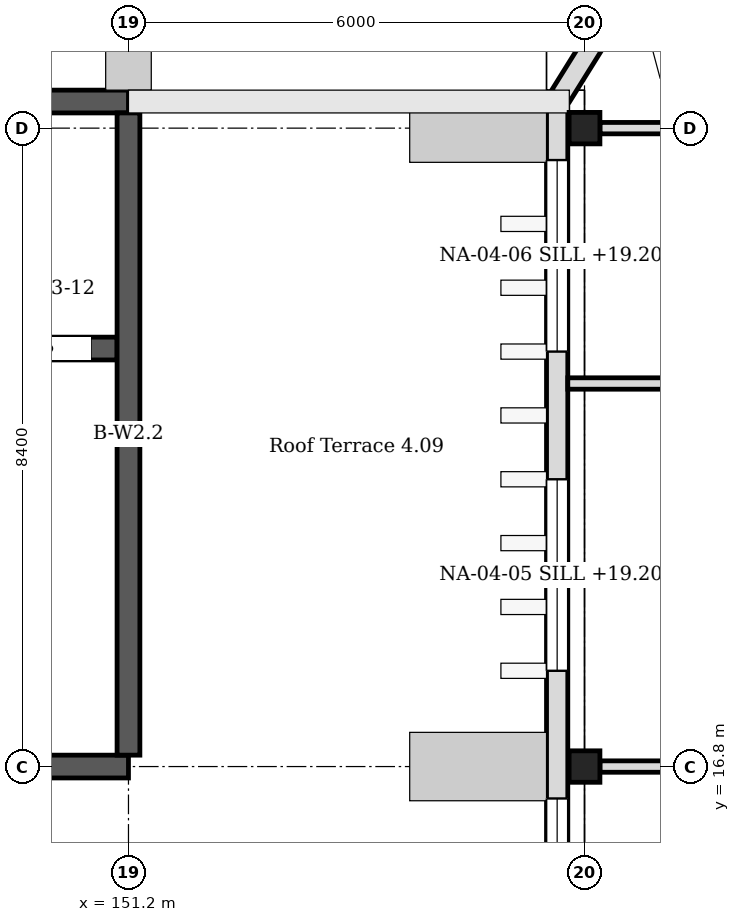
"""IFC4 building model, lengths in metres.
Left out: names, types, materials, properties, quantities, classifications, styles, units other than length and angle.
Written with IfcOpenShell. Run it as: python <this file> out.ifc"""

import sys

from ifc_helpers import new_model, si_unit, direction, frame, frame_2d, origin, origin_2d, place, context, subcontext, project, spatial, rectangle, i_section, extrude, element, fill, save


model = new_model("IFC4")
c1 = context("Model", 3, precision=1e-05, world=origin(), true_north=direction((0.0, 1.0)))
c2 = subcontext(c1, "Body", "Model", "MODEL_VIEW")
j1 = project(units=[si_unit("LENGTHUNIT", "METRE"), si_unit("PLANEANGLEUNIT", "RADIAN")], contexts=[c1])
p1 = place(None, origin())
s1 = spatial("IfcSite", under=j1, at=p1, CompositionType="ELEMENT")
p2 = place(p1, origin())
s2 = spatial("IfcBuilding", under=s1, at=p2, CompositionType="ELEMENT")
p3 = place(p2, frame((0.0, 0.0, 18.6)))
s3 = spatial("IfcBuildingStorey", under=s2, at=p3, CompositionType="ELEMENT", Elevation=18.6)
for number, where, z_axis, x_axis in (
    (1, (157.2, 16.8, 0.0), (0.0, 0.0, 1.0), (1.0, 0.0, 0.0)),
    (2, (157.2, 25.2, 0.0), (0.0, 0.0, 1.0), (1.0, 0.0, 0.0)),
):
    element("IfcColumn", number, at=place(p3, frame(where, z_axis=z_axis, x_axis=x_axis)), inside=s3, PredefinedType="COLUMN", context=c2, shape_type="SweptSolid", body=[
        extrude(i_section(OverallWidth=0.405, OverallDepth=0.414, WebThickness=0.018, FlangeThickness=0.028, FilletRadius=0.022, at=origin_2d()), origin(), (0.0, 0.0, 1.0), 4.2),
    ])
p4 = place(p3, frame((151.2, 16.95, 0.0), z_axis=(0.0, 0.0, 1.0), x_axis=(0.0, 1.0, 0.0)))
e3 = element("IfcWall", 3, at=p4, inside=s3, PredefinedType="SHEAR", context=c2, shape_type="SweptSolid", body=[
    extrude(rectangle(XDim=8.45, YDim=0.3, at=frame_2d((4.225, 0.0))), origin(), (0.0, 0.0, 1.0), 3.89),
])
p5 = place(p3, frame((142.8, 16.8, 0.0), z_axis=(0.0, 0.0, 1.0), x_axis=(1.0, 0.0, 0.0)))
e4 = element("IfcWall", 4, at=p5, inside=s3, PredefinedType="SHEAR", context=c2, shape_type="SweptSolid", body=[
    extrude(rectangle(XDim=8.4, YDim=0.3, at=frame_2d((4.2, 0.0))), origin(), (0.0, 0.0, 1.0), 3.89),
])
p6 = place(p5, frame((3.1, 0.0, 0.0)))
e5 = element("IfcOpeningElement", 5, at=p6, cuts=e4, PredefinedType="OPENING", context=c2, shape_type="SweptSolid", body=[
    extrude(rectangle(XDim=2.2, YDim=2.6, at=frame_2d((1.1, 1.3))), frame((0.0, 0.16, 0.0), z_axis=(0.0, -1.0, 0.0), x_axis=(1.0, 0.0, 0.0)), (0.0, 0.0, 1.0), 0.32),
])
p7 = place(p3, frame((142.95, 22.3, 0.0), z_axis=(0.0, 0.0, 1.0), x_axis=(1.0, 0.0, 0.0)))
e6 = element("IfcWall", 6, at=p7, inside=s3, PredefinedType="SHEAR", context=c2, shape_type="SweptSolid", body=[
    extrude(rectangle(XDim=8.1, YDim=0.3, at=frame_2d((4.05, 0.0))), origin(), (0.0, 0.0, 1.0), 3.89),
])
p8 = place(p7, frame((0.35, 0.0, 0.0)))
e7 = element("IfcOpeningElement", 7, at=p8, cuts=e6, PredefinedType="OPENING", context=c2, shape_type="SweptSolid", body=[
    extrude(rectangle(XDim=1.1, YDim=2.2, at=frame_2d((0.55, 1.1))), frame((0.0, 0.16, 0.0), z_axis=(0.0, -1.0, 0.0), x_axis=(1.0, 0.0, 0.0)), (0.0, 0.0, 1.0), 0.32),
])
p9 = place(p7, frame((6.65, 0.0, 0.0)))
e8 = element("IfcOpeningElement", 8, at=p9, cuts=e6, PredefinedType="OPENING", context=c2, shape_type="SweptSolid", body=[
    extrude(rectangle(XDim=1.1, YDim=2.2, at=frame_2d((0.55, 1.1))), frame((0.0, 0.16, 0.0), z_axis=(0.0, -1.0, 0.0), x_axis=(1.0, 0.0, 0.0)), (0.0, 0.0, 1.0), 0.32),
])
p10 = place(p3, frame((142.8, 25.55, 0.0), z_axis=(0.0, 0.0, 1.0), x_axis=(1.0, 0.0, 0.0)))
e9 = element("IfcWall", 9, at=p10, inside=s3, PredefinedType="SHEAR", context=c2, shape_type="SweptSolid", body=[
    extrude(rectangle(XDim=8.4, YDim=0.3, at=frame_2d((4.2, 0.0))), origin(), (0.0, 0.0, 1.0), 3.89),
])
p11 = place(p3, frame((156.84, -0.22, 0.0), z_axis=(0.0, 0.0, 1.0), x_axis=(0.0, 1.0, 0.0)))
e10 = element("IfcWall", 10, at=p11, inside=s3, PredefinedType="SOLIDWALL", context=c2, shape_type="SweptSolid", body=[
    extrude(rectangle(XDim=25.77, YDim=0.28, at=frame_2d((12.885, 0.0))), origin(), (0.0, 0.0, 1.0), 4.05),
])
p12 = place(p11, frame((0.64, 0.0, 0.6)))
e11 = element("IfcOpeningElement", 11, at=p12, cuts=e10, PredefinedType="OPENING", context=c2, shape_type="SweptSolid", body=[
    extrude(rectangle(XDim=2.52, YDim=2.4, at=frame_2d((1.26, 1.2))), frame((0.0, 0.15, 0.0), z_axis=(0.0, -1.0, 0.0), x_axis=(1.0, 0.0, 0.0)), (0.0, 0.0, 1.0), 0.3),
])
p13 = place(p11, frame((4.84, 0.0, 0.6)))
e12 = element("IfcOpeningElement", 12, at=p13, cuts=e10, PredefinedType="OPENING", context=c2, shape_type="SweptSolid", body=[
    extrude(rectangle(XDim=2.52, YDim=2.4, at=frame_2d((1.26, 1.2))), frame((0.0, 0.15, 0.0), z_axis=(0.0, -1.0, 0.0), x_axis=(1.0, 0.0, 0.0)), (0.0, 0.0, 1.0), 0.3),
])
p14 = place(p11, frame((9.88, 0.0, 0.6)))
e13 = element("IfcOpeningElement", 13, at=p14, cuts=e10, PredefinedType="OPENING", context=c2, shape_type="SweptSolid", body=[
    extrude(rectangle(XDim=2.52, YDim=2.4, at=frame_2d((1.26, 1.2))), frame((0.0, 0.15, 0.0), z_axis=(0.0, -1.0, 0.0), x_axis=(1.0, 0.0, 0.0)), (0.0, 0.0, 1.0), 0.3),
])
p15 = place(p11, frame((14.08, 0.0, 0.6)))
e14 = element("IfcOpeningElement", 14, at=p15, cuts=e10, PredefinedType="OPENING", context=c2, shape_type="SweptSolid", body=[
    extrude(rectangle(XDim=2.52, YDim=2.4, at=frame_2d((1.26, 1.2))), frame((0.0, 0.15, 0.0), z_axis=(0.0, -1.0, 0.0), x_axis=(1.0, 0.0, 0.0)), (0.0, 0.0, 1.0), 0.3),
])
p16 = place(p11, frame((18.28, 0.0, 0.6)))
e15 = element("IfcOpeningElement", 15, at=p16, cuts=e10, PredefinedType="OPENING", context=c2, shape_type="SweptSolid", body=[
    extrude(rectangle(XDim=2.52, YDim=2.4, at=frame_2d((1.26, 1.2))), frame((0.0, 0.15, 0.0), z_axis=(0.0, -1.0, 0.0), x_axis=(1.0, 0.0, 0.0)), (0.0, 0.0, 1.0), 0.3),
])
p17 = place(p11, frame((22.48, 0.0, 0.6)))
e16 = element("IfcOpeningElement", 16, at=p17, cuts=e10, PredefinedType="OPENING", context=c2, shape_type="SweptSolid", body=[
    extrude(rectangle(XDim=2.52, YDim=2.4, at=frame_2d((1.26, 1.2))), frame((0.0, 0.15, 0.0), z_axis=(0.0, -1.0, 0.0), x_axis=(1.0, 0.0, 0.0)), (0.0, 0.0, 1.0), 0.3),
])
p18 = place(p3, frame((156.886, 25.624, 0.0), z_axis=(0.0, 0.0, 1.0), x_axis=(0.528992500338, 0.848626498871, 0.0)))
e17 = element("IfcWall", 17, at=p18, inside=s3, PredefinedType="SOLIDWALL", context=c2, shape_type="SweptSolid", body=[
    extrude(rectangle(XDim=4.145, YDim=0.28, at=frame_2d((2.072, 0.0))), origin(), (0.0, 0.0, 1.0), 4.05),
])
p19 = place(p18, frame((0.812, 0.0, 0.6)))
e18 = element("IfcOpeningElement", 18, at=p19, cuts=e17, PredefinedType="OPENING", context=c2, shape_type="SweptSolid", body=[
    extrude(rectangle(XDim=2.52, YDim=2.4, at=frame_2d((1.26, 1.2))), frame((0.0, 0.15, 0.0), z_axis=(0.0, -1.0, 0.0), x_axis=(1.0, 0.0, 0.0)), (0.0, 0.0, 1.0), 0.3),
])
for number, where, z_axis, x_axis in (
    (19, (157.403, 16.8, 0.0), (0.0, 0.0, 1.0), (1.0, 0.0, 0.0)),
    (20, (157.403, 25.2, 0.0), (0.0, 0.0, 1.0), (1.0, 0.0, 0.0)),
):
    element("IfcWall", number, at=place(p3, frame(where, z_axis=z_axis, x_axis=x_axis)), inside=s3, PredefinedType="PARTITIONING", context=c2, shape_type="SweptSolid", body=[
        extrude(rectangle(XDim=7.995, YDim=0.15, at=frame_2d((3.998, 0.0))), origin(), (0.0, 0.0, 1.0), 3.604),
    ])
p20 = place(p3, frame((156.98, 21.84, 0.0), z_axis=(0.0, 0.0, 1.0), x_axis=(1.0, 0.0, 0.0)))
e21 = element("IfcWall", 21, at=p20, inside=s3, PredefinedType="PARTITIONING", context=c2, shape_type="SweptSolid", body=[
    extrude(rectangle(XDim=8.52, YDim=0.15, at=frame_2d((4.26, 0.0))), origin(), (0.0, 0.0, 1.0), 3.604),
])
p21 = place(p15, origin())
e22 = element("IfcWindow", 22, at=p21, inside=s3, PartitioningType="SINGLE_PANEL", PredefinedType="WINDOW", context=c2, shape_type="SweptSolid", body=[
    extrude(rectangle(XDim=2.52, YDim=2.4, at=frame_2d((1.26, 1.2))), frame((0.0, 0.03, 0.0), z_axis=(0.0, -1.0, 0.0), x_axis=(1.0, 0.0, 0.0)), (0.0, 0.0, 1.0), 0.06),
])
fill(e14, e22)
p22 = place(p16, origin())
e23 = element("IfcWindow", 23, at=p22, inside=s3, PartitioningType="SINGLE_PANEL", PredefinedType="WINDOW", context=c2, shape_type="SweptSolid", body=[
    extrude(rectangle(XDim=2.52, YDim=2.4, at=frame_2d((1.26, 1.2))), frame((0.0, 0.03, 0.0), z_axis=(0.0, -1.0, 0.0), x_axis=(1.0, 0.0, 0.0)), (0.0, 0.0, 1.0), 0.06),
])
fill(e15, e23)
p23 = place(p17, origin())
e24 = element("IfcWindow", 24, at=p23, inside=s3, PartitioningType="SINGLE_PANEL", PredefinedType="WINDOW", context=c2, shape_type="SweptSolid", body=[
    extrude(rectangle(XDim=2.52, YDim=2.4, at=frame_2d((1.26, 1.2))), frame((0.0, 0.03, 0.0), z_axis=(0.0, -1.0, 0.0), x_axis=(1.0, 0.0, 0.0)), (0.0, 0.0, 1.0), 0.06),
])
fill(e16, e24)
p24 = place(p9, origin())
e25 = element("IfcDoor", 25, at=p24, inside=s3, OperationType="SLIDING_TO_LEFT", PredefinedType="DOOR", context=c2, shape_type="SweptSolid", body=[
    extrude(rectangle(XDim=1.1, YDim=2.2, at=frame_2d((0.55, 1.1))), frame((0.0, 0.025, 0.0), z_axis=(0.0, -1.0, 0.0), x_axis=(1.0, 0.0, 0.0)), (0.0, 0.0, 1.0), 0.05),
])
fill(e8, e25)
save(model, sys.argv[1])
